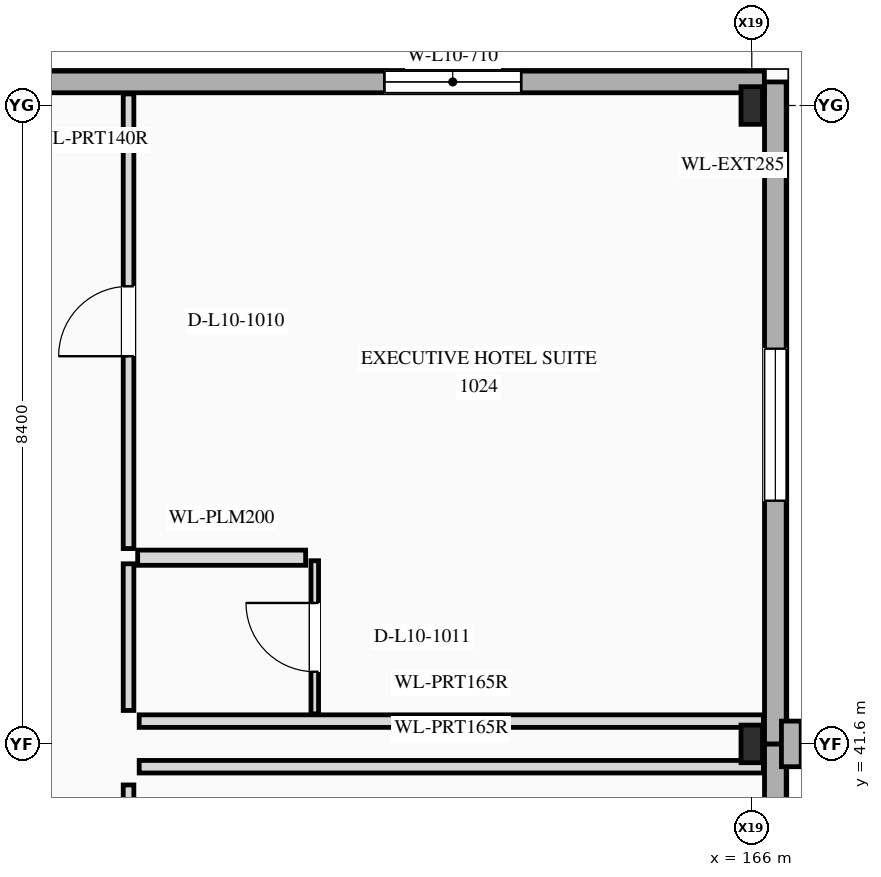
"""IFC4 building model, lengths in metres.
Left out: names, types, materials, properties, quantities, classifications, styles, units other than length and angle.
Written with IfcOpenShell. Run it as: python <this file> out.ifc"""

import sys

from ifc_helpers import new_model, si_unit, direction, frame, frame_2d, origin, origin_2d, place, context, subcontext, project, spatial, rectangle, i_section, extrude, element, fill, save


model = new_model("IFC4")
c1 = context("Model", 3, precision=1e-05, world=origin(), true_north=direction((0.0, 1.0)))
c2 = subcontext(c1, "Body", "Model", "MODEL_VIEW")
j1 = project(units=[si_unit("LENGTHUNIT", "METRE"), si_unit("PLANEANGLEUNIT", "RADIAN")], contexts=[c1])
p1 = place(None, origin())
s1 = spatial("IfcSite", under=j1, at=p1, CompositionType="ELEMENT")
p2 = place(p1, origin())
s2 = spatial("IfcBuilding", under=s1, at=p2, CompositionType="ELEMENT")
p3 = place(p2, frame((0.0, 0.0, 41.1)))
s3 = spatial("IfcBuildingStorey", under=s2, at=p3, CompositionType="ELEMENT", Elevation=41.1)
for number, where, z_axis, x_axis in (
    (1, (166.0, 41.6, 0.0), (0.0, 0.0, 1.0), (1.0, 0.0, 0.0)),
    (2, (166.0, 50.0, 0.0), (0.0, 0.0, 1.0), (1.0, 0.0, 0.0)),
):
    element("IfcColumn", number, at=place(p3, frame(where, z_axis=z_axis, x_axis=x_axis)), inside=s3, PredefinedType="COLUMN", context=c2, shape_type="SweptSolid", body=[
        extrude(i_section(OverallWidth=0.284, OverallDepth=0.495, WebThickness=0.019, FlangeThickness=0.033, at=origin_2d()), origin(), (0.0, 0.0, 1.0), 3.5),
    ])
p4 = place(p3, frame((166.31, 39.46, 0.0), z_axis=(0.0, 0.0, 1.0), x_axis=(0.0, 1.0, 0.0)))
e3 = element("IfcWall", 3, at=p4, inside=s3, PredefinedType="STANDARD", context=c2, shape_type="SweptSolid", body=[
    extrude(rectangle(XDim=2.14, YDim=0.285, at=frame_2d((1.07, 0.0))), origin(), (0.0, 0.0, 1.0), 3.5),
])
p5 = place(p3, frame((166.31, 41.6, 0.0), z_axis=(0.0, 0.0, 1.0), x_axis=(0.0, 1.0, 0.0)))
e4 = element("IfcWall", 4, at=p5, inside=s3, PredefinedType="STANDARD", context=c2, shape_type="SweptSolid", body=[
    extrude(rectangle(XDim=8.71, YDim=0.285, at=frame_2d((4.355, 0.0))), origin(), (0.0, 0.0, 1.0), 3.5),
])
p6 = place(p5, frame((3.2, 0.0, 0.85)))
e5 = element("IfcOpeningElement", 5, at=p6, cuts=e4, PredefinedType="OPENING", context=c2, shape_type="SweptSolid", body=[
    extrude(rectangle(XDim=2.0, YDim=1.65, at=frame_2d((1.0, 0.825))), frame((0.0, 0.152, 0.0), z_axis=(0.0, -1.0, 0.0), x_axis=(1.0, 0.0, 0.0)), (0.0, 0.0, 1.0), 0.305),
])
p7 = place(p3, frame((166.52, 41.3, 0.0), z_axis=(0.0, 0.0, 1.0), x_axis=(0.0, 1.0, 0.0)))
e6 = element("IfcWall", 6, at=p7, inside=s3, PredefinedType="ELEMENTEDWALL", context=c2, shape_type="SweptSolid", body=[
    extrude(rectangle(XDim=0.6, YDim=0.26, at=frame_2d((0.3, 0.0))), origin(), (0.0, 0.0, 1.0), 3.5),
])
p8 = place(p3, frame((166.166, 50.31, 0.0), z_axis=(0.0, 0.0, 1.0), x_axis=(-1.0, 0.0, 0.0)))
e7 = element("IfcWall", 7, at=p8, inside=s3, PredefinedType="STANDARD", context=c2, shape_type="SweptSolid", body=[
    extrude(rectangle(XDim=19.131, YDim=0.285, at=frame_2d((9.565, 0.0))), origin(), (0.0, 0.0, 1.0), 3.5),
])
p9 = place(p8, frame((3.2, 0.0, 0.88)))
e8 = element("IfcOpeningElement", 8, at=p9, cuts=e7, PredefinedType="OPENING", context=c2, shape_type="SweptSolid", body=[
    extrude(rectangle(XDim=1.8, YDim=1.8, at=frame_2d((0.9, 0.9))), frame((0.0, 0.152, 0.0), z_axis=(0.0, -1.0, 0.0), x_axis=(1.0, 0.0, 0.0)), (0.0, 0.0, 1.0), 0.305),
])
p10 = place(p8, frame((13.5, 0.0, 0.88)))
e9 = element("IfcOpeningElement", 9, at=p10, cuts=e7, PredefinedType="OPENING", context=c2, shape_type="SweptSolid", body=[
    extrude(rectangle(XDim=1.8, YDim=1.8, at=frame_2d((0.9, 0.9))), frame((0.0, 0.152, 0.0), z_axis=(0.0, -1.0, 0.0), x_axis=(1.0, 0.0, 0.0)), (0.0, 0.0, 1.0), 0.305),
])
p11 = place(p3, frame((157.8, 35.77, 0.0), z_axis=(0.0, 0.0, 1.0), x_axis=(0.0, 1.0, 0.0)))
e10 = element("IfcWall", 10, at=p11, inside=s3, PredefinedType="PARTITIONING", context=c2, shape_type="SweptSolid", body=[
    extrude(rectangle(XDim=5.29, YDim=0.14, at=frame_2d((2.645, 0.0))), origin(), (0.0, 0.0, 1.0), 3.18),
])
p12 = place(p11, frame((2.125, 0.0, 0.0)))
e11 = element("IfcOpeningElement", 11, at=p12, cuts=e10, PredefinedType="OPENING", context=c2, shape_type="SweptSolid", body=[
    extrude(rectangle(XDim=1.04, YDim=2.4, at=frame_2d((0.52, 1.2))), frame((0.0, 0.08, 0.0), z_axis=(0.0, -1.0, 0.0), x_axis=(1.0, 0.0, 0.0)), (0.0, 0.0, 1.0), 0.16),
])
p13 = place(p3, frame((157.94, 41.3, 0.0), z_axis=(0.0, 0.0, 1.0), x_axis=(1.0, 0.0, 0.0)))
e12 = element("IfcWall", 12, at=p13, inside=s3, PredefinedType="PARTITIONING", context=c2, shape_type="SweptSolid", body=[
    extrude(rectangle(XDim=8.213, YDim=0.165, at=frame_2d((4.106, 0.0))), origin(), (0.0, 0.0, 1.0), 2.57),
])
p14 = place(p3, frame((157.8, 42.04, 0.0), z_axis=(0.0, 0.0, 1.0), x_axis=(0.0, 1.0, 0.0)))
e13 = element("IfcWall", 13, at=p14, inside=s3, PredefinedType="PARTITIONING", context=c2, shape_type="SweptSolid", body=[
    extrude(rectangle(XDim=1.93, YDim=0.14, at=frame_2d((0.965, 0.0))), origin(), (0.0, 0.0, 1.0), 3.18),
])
p15 = place(p3, frame((157.8, 44.17, 0.0), z_axis=(0.0, 0.0, 1.0), x_axis=(0.0, 1.0, 0.0)))
e14 = element("IfcWall", 14, at=p15, inside=s3, PredefinedType="PARTITIONING", context=c2, shape_type="SweptSolid", body=[
    extrude(rectangle(XDim=5.983, YDim=0.14, at=frame_2d((2.991, 0.0))), origin(), (0.0, 0.0, 1.0), 3.18),
])
p16 = place(p15, frame((2.531, 0.0, 0.0)))
e15 = element("IfcOpeningElement", 15, at=p16, cuts=e14, PredefinedType="OPENING", context=c2, shape_type="SweptSolid", body=[
    extrude(rectangle(XDim=0.92, YDim=2.15, at=frame_2d((0.46, 1.075))), frame((0.0, 0.08, 0.0), z_axis=(0.0, -1.0, 0.0), x_axis=(1.0, 0.0, 0.0)), (0.0, 0.0, 1.0), 0.16),
])
p17 = place(p3, frame((157.94, 41.9, 0.0), z_axis=(0.0, 0.0, 1.0), x_axis=(1.0, 0.0, 0.0)))
e16 = element("IfcWall", 16, at=p17, inside=s3, PredefinedType="PARTITIONING", context=c2, shape_type="SweptSolid", body=[
    extrude(rectangle(XDim=8.213, YDim=0.165, at=frame_2d((4.106, 0.0))), origin(), (0.0, 0.0, 1.0), 2.57),
])
p18 = place(p3, frame((157.92, 44.05, 0.0), z_axis=(0.0, 0.0, 1.0), x_axis=(1.0, 0.0, 0.0)))
e17 = element("IfcWall", 17, at=p18, inside=s3, PredefinedType="PLUMBINGWALL", context=c2, shape_type="SweptSolid", body=[
    extrude(rectangle(XDim=2.21, YDim=0.2, at=frame_2d((1.105, 0.0))), origin(), (0.0, 0.0, 1.0), 3.18),
])
p19 = place(p3, frame((160.25, 41.994, 0.0), z_axis=(0.0, 0.0, 1.0), x_axis=(0.0, 1.0, 0.0)))
e18 = element("IfcWall", 18, at=p19, inside=s3, PredefinedType="PARTITIONING", context=c2, shape_type="SweptSolid", body=[
    extrude(rectangle(XDim=2.016, YDim=0.1, at=frame_2d((1.008, 0.0))), origin(), (0.0, 0.0, 1.0), 3.18),
])
p20 = place(p19, frame((0.555, 0.0, 0.0)))
e19 = element("IfcOpeningElement", 19, at=p20, cuts=e18, PredefinedType="OPENING", context=c2, shape_type="SweptSolid", body=[
    extrude(rectangle(XDim=0.905, YDim=2.1, at=frame_2d((0.453, 1.05))), frame((0.0, 0.06, 0.0), z_axis=(0.0, -1.0, 0.0), x_axis=(1.0, 0.0, 0.0)), (0.0, 0.0, 1.0), 0.12),
])
p21 = place(p6, origin())
e20 = element("IfcWindow", 20, at=p21, inside=s3, PartitioningType="SINGLE_PANEL", PredefinedType="WINDOW", context=c2, shape_type="SweptSolid", body=[
    extrude(rectangle(XDim=2.0, YDim=1.65, at=frame_2d((1.0, 0.825))), frame((0.0, 0.03, 0.0), z_axis=(0.0, -1.0, 0.0), x_axis=(1.0, 0.0, 0.0)), (0.0, 0.0, 1.0), 0.06),
])
fill(e5, e20)
p22 = place(p9, origin())
e21 = element("IfcWindow", 21, at=p22, inside=s3, PartitioningType="SINGLE_PANEL", PredefinedType="WINDOW", context=c2, shape_type="SweptSolid", body=[
    extrude(rectangle(XDim=1.8, YDim=1.8, at=frame_2d((0.9, 0.9))), frame((0.0, 0.03, 0.0), z_axis=(0.0, -1.0, 0.0), x_axis=(1.0, 0.0, 0.0)), (0.0, 0.0, 1.0), 0.06),
])
fill(e8, e21)
p23 = place(p16, origin())
e22 = element("IfcDoor", 22, at=p23, inside=s3, OperationType="SINGLE_SWING_LEFT", PredefinedType="DOOR", context=c2, shape_type="SweptSolid", body=[
    extrude(rectangle(XDim=0.92, YDim=2.15, at=frame_2d((0.46, 1.075))), frame((0.0, 0.025, 0.0), z_axis=(0.0, -1.0, 0.0), x_axis=(1.0, 0.0, 0.0)), (0.0, 0.0, 1.0), 0.05),
])
fill(e15, e22)
p24 = place(p20, origin())
e23 = element("IfcDoor", 23, at=p24, inside=s3, OperationType="SINGLE_SWING_RIGHT", PredefinedType="DOOR", context=c2, shape_type="SweptSolid", body=[
    extrude(rectangle(XDim=0.905, YDim=2.1, at=frame_2d((0.453, 1.05))), frame((0.0, 0.025, 0.0), z_axis=(0.0, -1.0, 0.0), x_axis=(1.0, 0.0, 0.0)), (0.0, 0.0, 1.0), 0.05),
])
fill(e19, e23)
save(model, sys.argv[1])
